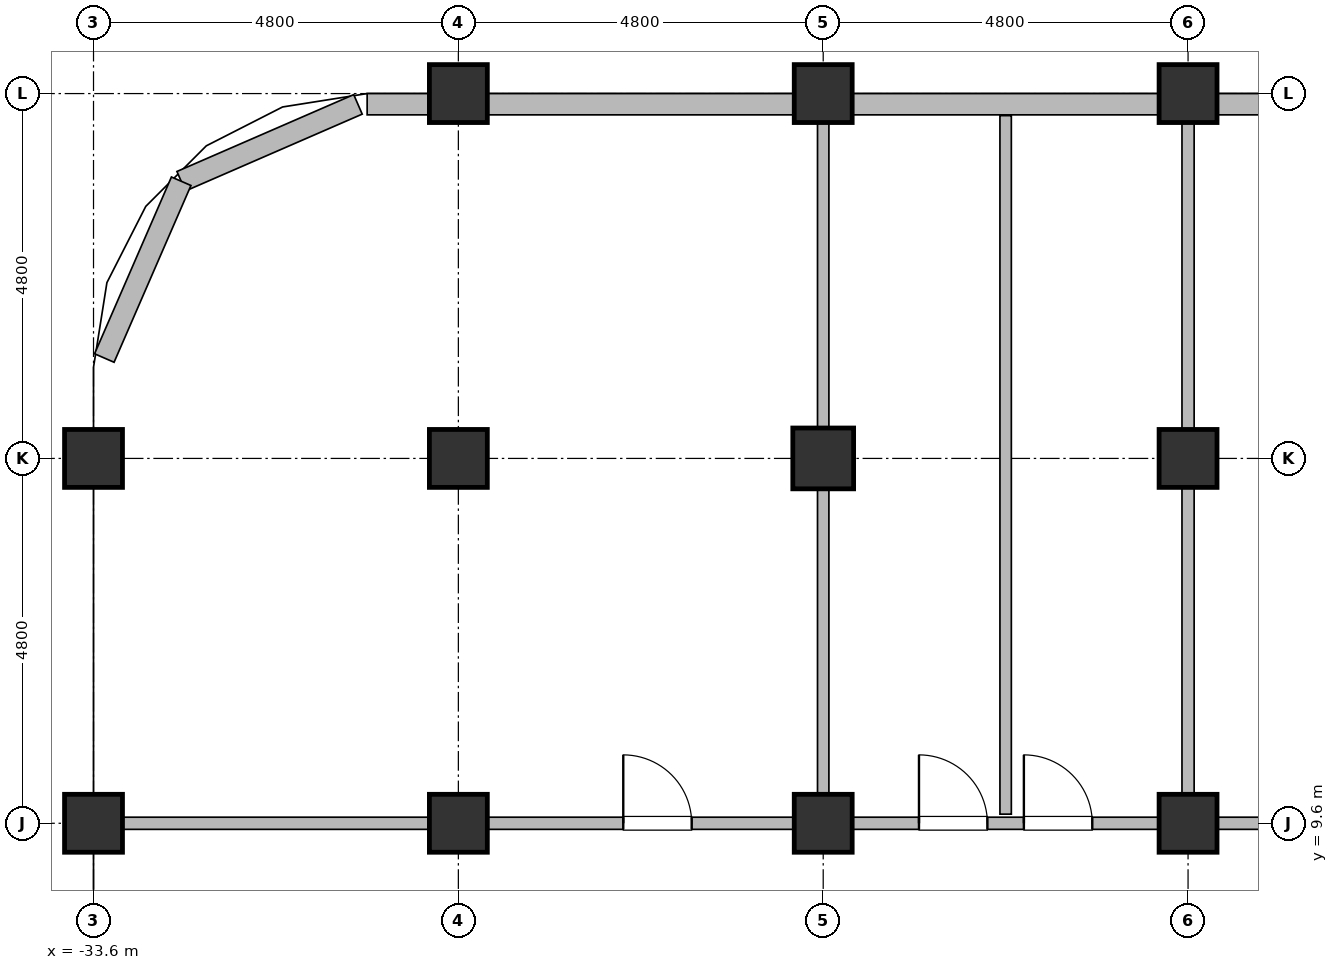
"""IFC4 building model, lengths in metres.
Left out: names, types, materials, properties, quantities, classifications, styles, units other than length and angle.
Written with IfcOpenShell. Run it as: python <this file> out.ifc"""

import sys

from ifc_helpers import new_model, si_unit, direction, frame, frame_2d, origin, origin_2d, place, context, subcontext, project, spatial, rectangle, hollow_rectangle, hollow_circle, extrude, element, fill, save


model = new_model("IFC4")
c1 = context("Model", 3, precision=1e-05, world=origin(), true_north=direction((0.0, 1.0)))
c2 = subcontext(c1, "Body", "Model", "MODEL_VIEW")
j1 = project(units=[si_unit("LENGTHUNIT", "METRE"), si_unit("PLANEANGLEUNIT", "RADIAN")], contexts=[c1])
p1 = place(None, origin())
s1 = spatial("IfcSite", under=j1, at=p1, CompositionType="ELEMENT")
p2 = place(p1, origin())
s2 = spatial("IfcBuilding", under=s1, at=p2, CompositionType="ELEMENT")
p3 = place(p2, frame((0.0, 0.0, 48.5)))
s3 = spatial("IfcBuildingStorey", under=s2, at=p3, CompositionType="ELEMENT", Elevation=48.5)
for number, where, z_axis, x_axis in (
    (1, (-33.6, 9.6, 0.0), (0.0, 0.0, 1.0), (1.0, 0.0, 0.0)),
    (2, (-33.6, 14.4, 0.0), (0.0, 0.0, 1.0), (1.0, 0.0, 0.0)),
    (3, (-28.8, 9.6, 0.0), (0.0, 0.0, 1.0), (1.0, 0.0, 0.0)),
    (4, (-28.8, 14.4, 0.0), (0.0, 0.0, 1.0), (1.0, 0.0, 0.0)),
    (5, (-28.8, 19.2, 0.0), (0.0, 0.0, 1.0), (1.0, 0.0, 0.0)),
    (6, (-24.0, 9.6, 0.0), (0.0, 0.0, 1.0), (1.0, 0.0, 0.0)),
):
    element("IfcColumn", number, at=place(p3, frame(where, z_axis=z_axis, x_axis=x_axis)), inside=s3, PredefinedType="COLUMN", context=c2, shape_type="SweptSolid", body=[
        extrude(hollow_circle(Radius=0.381, WallThickness=0.032, at=origin_2d()), origin(), (0.0, 0.0, 1.0), 3.7),
    ])
p4 = place(p3, frame((-24.0, 14.4, 0.0), z_axis=(0.0, 0.0, 1.0), x_axis=(1.0, 0.0, 0.0)))
e7 = element("IfcColumn", 7, at=p4, inside=s3, PredefinedType="COLUMN", context=c2, shape_type="SweptSolid", body=[
    extrude(hollow_rectangle(XDim=0.8, YDim=0.8, WallThickness=0.036, at=origin_2d()), origin(), (0.0, 0.0, 1.0), 3.7),
])
for number, where, z_axis, x_axis in (
    (8, (-24.0, 19.2, 0.0), (0.0, 0.0, 1.0), (1.0, 0.0, 0.0)),
    (9, (-19.2, 9.6, 0.0), (0.0, 0.0, 1.0), (1.0, 0.0, 0.0)),
    (10, (-19.2, 14.4, 0.0), (0.0, 0.0, 1.0), (1.0, 0.0, 0.0)),
    (11, (-19.2, 19.2, 0.0), (0.0, 0.0, 1.0), (1.0, 0.0, 0.0)),
):
    element("IfcColumn", number, at=place(p3, frame(where, z_axis=z_axis, x_axis=x_axis)), inside=s3, PredefinedType="COLUMN", context=c2, shape_type="SweptSolid", body=[
        extrude(hollow_circle(Radius=0.381, WallThickness=0.032, at=origin_2d()), origin(), (0.0, 0.0, 1.0), 3.7),
    ])
p5 = place(p3, frame((-30.121, 19.058, 0.0), z_axis=(0.0, 0.0, 1.0), x_axis=(-0.917060872934, -0.398747232384, 0.0)))
e12 = element("IfcWall", 12, at=p5, inside=s3, PredefinedType="SOLIDWALL", context=c2, shape_type="SweptSolid", body=[
    extrude(rectangle(XDim=2.536, YDim=0.28, at=frame_2d((1.268, 0.0))), origin(), (0.0, 0.0, 1.0), 2.12),
])
p6 = place(p3, frame((-32.447, 18.047, 0.0), z_axis=(0.0, 0.0, 1.0), x_axis=(-0.398792985289, -0.917040977756, 0.0)))
e13 = element("IfcWall", 13, at=p6, inside=s3, PredefinedType="SOLIDWALL", context=c2, shape_type="SweptSolid", body=[
    extrude(rectangle(XDim=2.536, YDim=0.28, at=frame_2d((1.268, 0.0))), origin(), (0.0, 0.0, 1.0), 2.12),
])
p7 = place(p3, frame((-30.0, 19.06, 0.0), z_axis=(0.0, 0.0, 1.0), x_axis=(1.0, 0.0, 0.0)))
e14 = element("IfcWall", 14, at=p7, inside=s3, PredefinedType="SOLIDWALL", context=c2, shape_type="SweptSolid", body=[
    extrude(rectangle(XDim=25.25, YDim=0.28, at=frame_2d((12.625, 0.0))), origin(), (0.0, 0.0, 1.0), 2.12),
])
p8 = place(p7, frame((9.0, 0.0, 0.75)))
e15 = element("IfcOpeningElement", 15, at=p8, cuts=e14, PredefinedType="OPENING", context=c2, shape_type="SweptSolid", body=[
    extrude(rectangle(XDim=1.2, YDim=1.15, at=frame_2d((0.6, 0.575))), frame((0.0, 0.155, 0.0), z_axis=(0.0, -1.0, 0.0), x_axis=(1.0, 0.0, 0.0)), (0.0, 0.0, 1.0), 0.31),
])
p9 = place(p7, frame((12.3, 0.0, 0.75)))
e16 = element("IfcOpeningElement", 16, at=p9, cuts=e14, PredefinedType="OPENING", context=c2, shape_type="SweptSolid", body=[
    extrude(rectangle(XDim=1.8, YDim=1.15, at=frame_2d((0.9, 0.575))), frame((0.0, 0.155, 0.0), z_axis=(0.0, -1.0, 0.0), x_axis=(1.0, 0.0, 0.0)), (0.0, 0.0, 1.0), 0.31),
])
p10 = place(p3, frame((-33.43, 9.6, 0.0), z_axis=(0.0, 0.0, 1.0), x_axis=(1.0, 0.0, 0.0)))
e17 = element("IfcWall", 17, at=p10, inside=s3, PredefinedType="PARTITIONING", context=c2, shape_type="SweptSolid", body=[
    extrude(rectangle(XDim=62.06, YDim=0.16, at=frame_2d((31.03, 0.0))), origin(), (0.0, 0.0, 1.0), 2.62),
])
p11 = place(p10, frame((6.8, 0.0, 0.0)))
e18 = element("IfcOpeningElement", 18, at=p11, cuts=e17, PredefinedType="OPENING", context=c2, shape_type="SweptSolid", body=[
    extrude(rectangle(XDim=0.9, YDim=2.1, at=frame_2d((0.45, 1.05))), frame((0.0, 0.095, 0.0), z_axis=(0.0, -1.0, 0.0), x_axis=(1.0, 0.0, 0.0)), (0.0, 0.0, 1.0), 0.19),
])
p12 = place(p10, frame((54.361, 0.0, 0.0)))
e19 = element("IfcOpeningElement", 19, at=p12, cuts=e17, PredefinedType="OPENING", context=c2, shape_type="SweptSolid", body=[
    extrude(rectangle(XDim=0.9, YDim=2.1, at=frame_2d((0.45, 1.05))), frame((0.0, 0.095, 0.0), z_axis=(0.0, -1.0, 0.0), x_axis=(1.0, 0.0, 0.0)), (0.0, 0.0, 1.0), 0.19),
])
p13 = place(p10, frame((10.69, 0.0, 0.0)))
e20 = element("IfcOpeningElement", 20, at=p13, cuts=e17, PredefinedType="OPENING", context=c2, shape_type="SweptSolid", body=[
    extrude(rectangle(XDim=0.9, YDim=2.1, at=frame_2d((0.45, 1.05))), frame((0.0, 0.095, 0.0), z_axis=(0.0, -1.0, 0.0), x_axis=(1.0, 0.0, 0.0)), (0.0, 0.0, 1.0), 0.19),
])
p14 = place(p10, frame((12.07, 0.0, 0.0)))
e21 = element("IfcOpeningElement", 21, at=p14, cuts=e17, PredefinedType="OPENING", context=c2, shape_type="SweptSolid", body=[
    extrude(rectangle(XDim=0.9, YDim=2.1, at=frame_2d((0.45, 1.05))), frame((0.0, 0.095, 0.0), z_axis=(0.0, -1.0, 0.0), x_axis=(1.0, 0.0, 0.0)), (0.0, 0.0, 1.0), 0.19),
])
p15 = place(p10, frame((15.6, 0.0, 0.0)))
e22 = element("IfcOpeningElement", 22, at=p15, cuts=e17, PredefinedType="OPENING", context=c2, shape_type="SweptSolid", body=[
    extrude(rectangle(XDim=0.92, YDim=2.15, at=frame_2d((0.46, 1.075))), frame((0.0, 0.095, 0.0), z_axis=(0.0, -1.0, 0.0), x_axis=(1.0, 0.0, 0.0)), (0.0, 0.0, 1.0), 0.19),
])
p16 = place(p10, frame((20.98, 0.0, 0.0)))
e23 = element("IfcOpeningElement", 23, at=p16, cuts=e17, PredefinedType="OPENING", context=c2, shape_type="SweptSolid", body=[
    extrude(rectangle(XDim=0.9, YDim=2.1, at=frame_2d((0.45, 1.05))), frame((0.0, 0.095, 0.0), z_axis=(0.0, -1.0, 0.0), x_axis=(1.0, 0.0, 0.0)), (0.0, 0.0, 1.0), 0.19),
])
p17 = place(p10, frame((35.38, 0.0, 0.0)))
e24 = element("IfcOpeningElement", 24, at=p17, cuts=e17, PredefinedType="OPENING", context=c2, shape_type="SweptSolid", body=[
    extrude(rectangle(XDim=0.9, YDim=2.1, at=frame_2d((0.45, 1.05))), frame((0.0, 0.095, 0.0), z_axis=(0.0, -1.0, 0.0), x_axis=(1.0, 0.0, 0.0)), (0.0, 0.0, 1.0), 0.19),
])
p18 = place(p10, frame((46.035, 0.0, 0.0)))
e25 = element("IfcOpeningElement", 25, at=p18, cuts=e17, PredefinedType="OPENING", context=c2, shape_type="SweptSolid", body=[
    extrude(rectangle(XDim=0.92, YDim=2.15, at=frame_2d((0.46, 1.075))), frame((0.0, 0.095, 0.0), z_axis=(0.0, -1.0, 0.0), x_axis=(1.0, 0.0, 0.0)), (0.0, 0.0, 1.0), 0.19),
])
p19 = place(p10, frame((48.705, 0.0, 0.0)))
e26 = element("IfcOpeningElement", 26, at=p19, cuts=e17, PredefinedType="OPENING", context=c2, shape_type="SweptSolid", body=[
    extrude(rectangle(XDim=0.92, YDim=2.15, at=frame_2d((0.46, 1.075))), frame((0.0, 0.095, 0.0), z_axis=(0.0, -1.0, 0.0), x_axis=(1.0, 0.0, 0.0)), (0.0, 0.0, 1.0), 0.19),
])
for number, where, z_axis, x_axis in (
    (27, (-24.0, 9.72, 0.0), (0.0, 0.0, 1.0), (0.0, 1.0, 0.0)),
    (28, (-21.6, 9.72, 0.0), (0.0, 0.0, 1.0), (0.0, 1.0, 0.0)),
):
    element("IfcWall", number, at=place(p3, frame(where, z_axis=z_axis, x_axis=x_axis)), inside=s3, PredefinedType="PARTITIONING", context=c2, shape_type="SweptSolid", body=[
        extrude(rectangle(XDim=9.19, YDim=0.15, at=frame_2d((4.595, 0.0))), origin(), (0.0, 0.0, 1.0), 2.62),
    ])
p20 = place(p3, frame((-19.2, 9.72, 0.0), z_axis=(0.0, 0.0, 1.0), x_axis=(0.0, 1.0, 0.0)))
e29 = element("IfcWall", 29, at=p20, inside=s3, PredefinedType="PARTITIONING", context=c2, shape_type="SweptSolid", body=[
    extrude(rectangle(XDim=9.19, YDim=0.16, at=frame_2d((4.595, 0.0))), origin(), (0.0, 0.0, 1.0), 2.62),
])
p21 = place(p8, origin())
e30 = element("IfcWindow", 30, at=p21, inside=s3, PartitioningType="SINGLE_PANEL", PredefinedType="WINDOW", context=c2, shape_type="SweptSolid", body=[
    extrude(rectangle(XDim=1.2, YDim=1.15, at=frame_2d((0.6, 0.575))), frame((0.0, 0.03, 0.0), z_axis=(0.0, -1.0, 0.0), x_axis=(1.0, 0.0, 0.0)), (0.0, 0.0, 1.0), 0.06),
])
fill(e15, e30)
p22 = place(p11, origin())
e31 = element("IfcDoor", 31, at=p22, inside=s3, OperationType="SINGLE_SWING_RIGHT", PredefinedType="DOOR", context=c2, shape_type="SweptSolid", body=[
    extrude(rectangle(XDim=0.9, YDim=2.1, at=frame_2d((0.45, 1.05))), frame((0.0, 0.025, 0.0), z_axis=(0.0, -1.0, 0.0), x_axis=(1.0, 0.0, 0.0)), (0.0, 0.0, 1.0), 0.05),
])
fill(e18, e31)
p23 = place(p13, origin())
e32 = element("IfcDoor", 32, at=p23, inside=s3, OperationType="SINGLE_SWING_LEFT", PredefinedType="DOOR", context=c2, shape_type="SweptSolid", body=[
    extrude(rectangle(XDim=0.9, YDim=2.1, at=frame_2d((0.45, 1.05))), frame((0.0, 0.025, 0.0), z_axis=(0.0, -1.0, 0.0), x_axis=(1.0, 0.0, 0.0)), (0.0, 0.0, 1.0), 0.05),
])
fill(e20, e32)
p24 = place(p14, origin())
e33 = element("IfcDoor", 33, at=p24, inside=s3, OperationType="SINGLE_SWING_LEFT", PredefinedType="DOOR", context=c2, shape_type="SweptSolid", body=[
    extrude(rectangle(XDim=0.9, YDim=2.1, at=frame_2d((0.45, 1.05))), frame((0.0, 0.025, 0.0), z_axis=(0.0, -1.0, 0.0), x_axis=(1.0, 0.0, 0.0)), (0.0, 0.0, 1.0), 0.05),
])
fill(e21, e33)
save(model, sys.argv[1])
